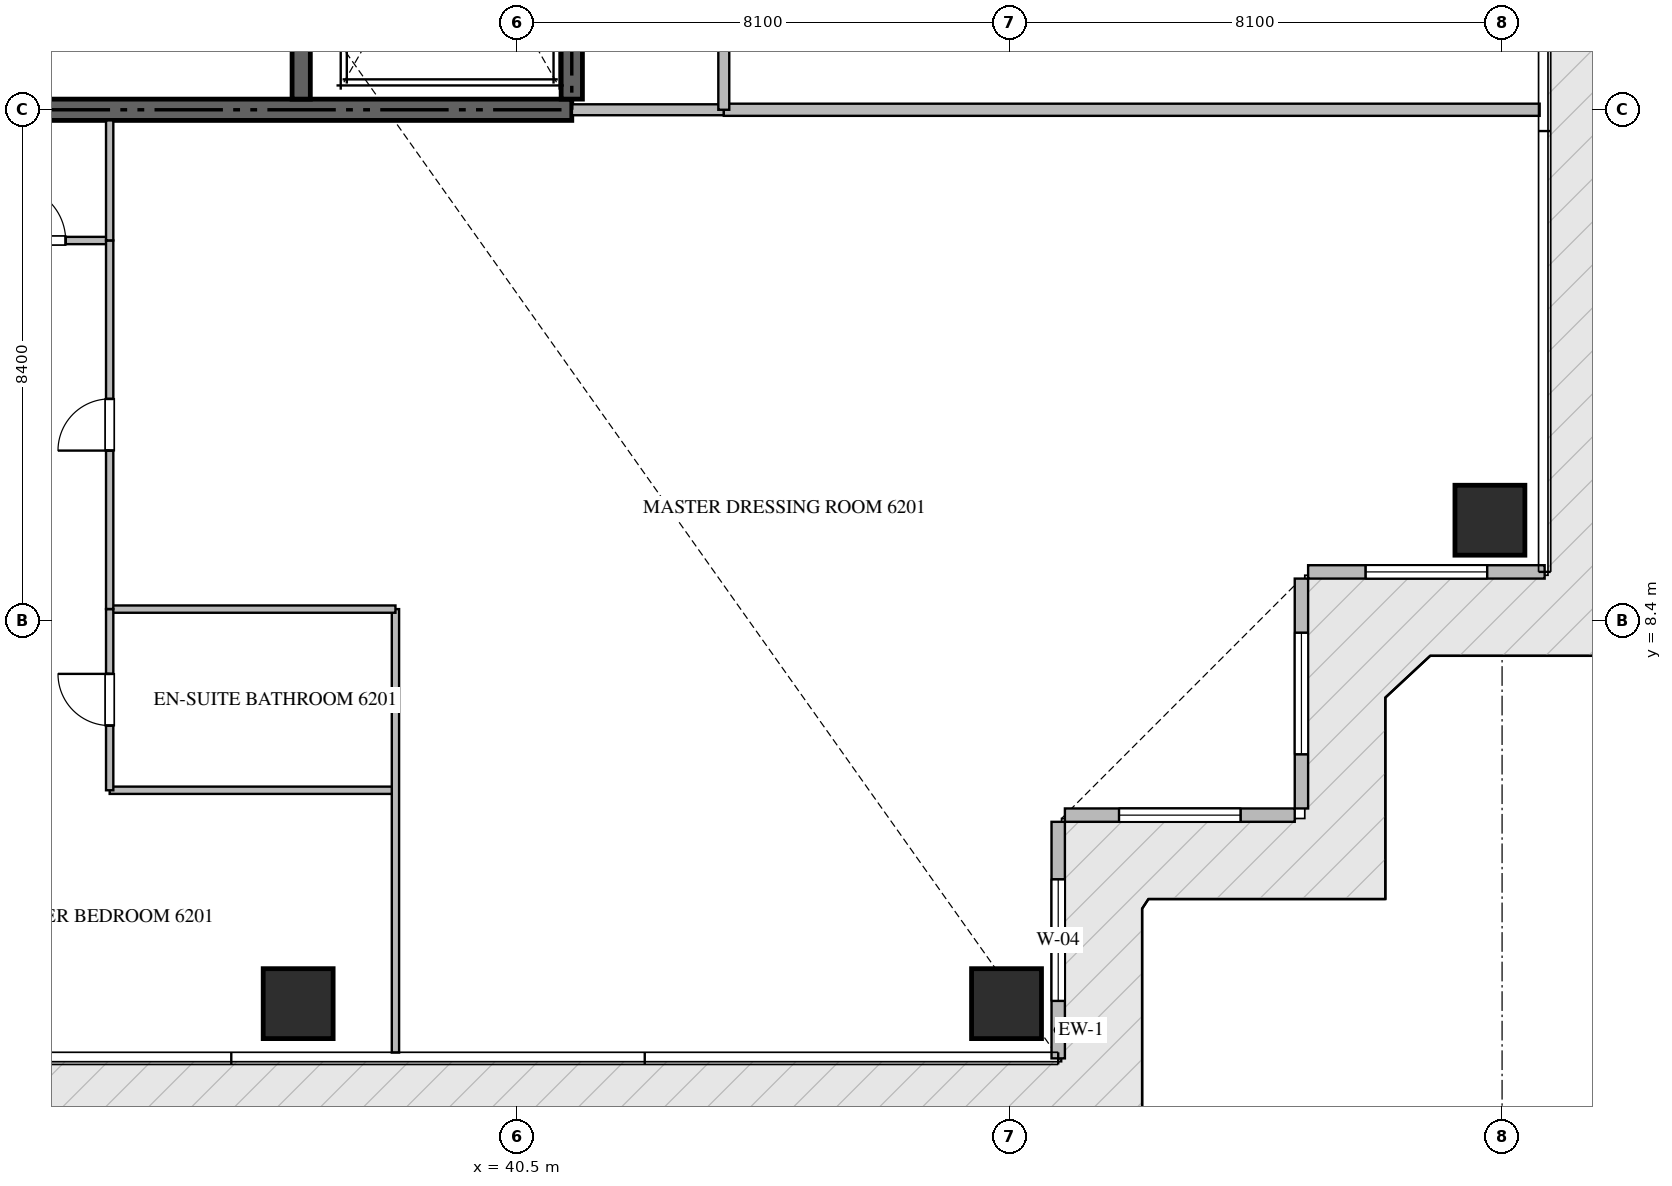
"""IFC4 building model, lengths in metres.
Left out: names, types, materials, properties, quantities, classifications, styles, units other than length and angle.
Written with IfcOpenShell. Run it as: python <this file> out.ifc"""

import sys

from ifc_helpers import new_model, si_unit, direction, frame, frame_2d, origin, origin_2d, place, context, subcontext, project, spatial, rectangle, extrude, source, transform, mapped, element, fill, save


model = new_model("IFC4")
c1 = context("Model", 3, precision=1e-05, world=origin(), true_north=direction((0.0, 1.0)))
c2 = subcontext(c1, "Body", "Model", "MODEL_VIEW")
j1 = project(units=[si_unit("LENGTHUNIT", "METRE"), si_unit("PLANEANGLEUNIT", "RADIAN")], contexts=[c1])
p1 = place(None, origin())
s1 = spatial("IfcSite", under=j1, at=p1, CompositionType="ELEMENT")
p2 = place(p1, origin())
s2 = spatial("IfcBuilding", under=s1, at=p2, CompositionType="ELEMENT")
p3 = place(p2, frame((0.0, 0.0, 248.95)))
s3 = spatial("IfcBuildingStorey", under=s2, at=p3, CompositionType="ELEMENT", Elevation=248.95)
p4 = place(p3, frame((23.4, 16.8, -0.26), z_axis=(0.0, 0.0, 1.0), x_axis=(1.0, 0.0, 0.0)))
e1 = element("IfcWall", 1, at=p4, inside=s3, PredefinedType="SHEAR", context=c2, shape_type="SweptSolid", body=[
    extrude(rectangle(XDim=18.0, YDim=0.35, at=frame_2d((9.0, 0.0))), origin(), (0.0, 0.0, 1.0), 3.848),
])
p5 = place(p3, frame((41.4, 16.975, -0.26), z_axis=(0.0, 0.0, 1.0), x_axis=(0.0, 1.0, 0.0)))
e2 = element("IfcWall", 2, at=p5, inside=s3, PredefinedType="SHEAR", context=c2, shape_type="SweptSolid", body=[
    extrude(rectangle(XDim=8.375, YDim=0.35, at=frame_2d((4.188, 0.0))), origin(), (0.0, 0.0, 1.0), 3.848),
])
p6 = place(p3, frame((36.95, 16.975, -0.26), z_axis=(0.0, 0.0, 1.0), x_axis=(0.0, 1.0, 0.0)))
e3 = element("IfcWall", 3, at=p6, inside=s3, PredefinedType="SHEAR", context=c2, shape_type="SweptSolid", body=[
    extrude(rectangle(XDim=8.375, YDim=0.3, at=frame_2d((4.188, 0.0))), origin(), (0.0, 0.0, 1.0), 3.848),
])
m1 = source(origin(), c2, "Body", "SweptSolid", [
    extrude(rectangle(XDim=1.15, YDim=1.15, at=origin_2d()), origin(), (0.0, 0.0, 1.0), 3.85),
])
for number, where, z_axis, x_axis in (
    (4, (36.9, 2.1, -0.26), (0.0, 0.0, 1.0), (1.0, 0.0, 0.0)),
    (5, (48.55, 2.1, -0.26), (0.0, 0.0, 1.0), (1.0, 0.0, 0.0)),
    (6, (56.5, 10.05, -0.26), (0.0, 0.0, 1.0), (1.0, 0.0, 0.0)),
):
    element("IfcColumn", number, at=place(p3, frame(where, z_axis=z_axis, x_axis=x_axis)), inside=s3, PredefinedType="COLUMN", context=c2, shape_type="MappedRepresentation", body=[
        mapped(m1, transform((0.0, 0.0, 0.0), scale=1.0)),
    ])
p7 = place(p3, frame((49.4, 1.2, 0.0), z_axis=(0.0, 0.0, 1.0), x_axis=(0.0, 1.0, 0.0)))
e7 = element("IfcWall", 7, at=p7, inside=s3, PredefinedType="ELEMENTEDWALL", context=c2, shape_type="SweptSolid", body=[
    extrude(rectangle(XDim=3.89, YDim=0.22, at=frame_2d((1.945, 0.0))), origin(), (0.0, 0.0, 1.0), 3.575),
])
p8 = place(p7, frame((0.945, 0.0, 0.65)))
e8 = element("IfcOpeningElement", 8, at=p8, cuts=e7, PredefinedType="OPENING", context=c2, shape_type="SweptSolid", body=[
    extrude(rectangle(XDim=2.0, YDim=2.2, at=frame_2d((1.0, 1.1))), frame((0.0, 0.12, 0.0), z_axis=(0.0, -1.0, 0.0), x_axis=(1.0, 0.0, 0.0)), (0.0, 0.0, 1.0), 0.24),
])
p9 = place(p3, frame((49.51, 5.2, 0.0), z_axis=(0.0, 0.0, 1.0), x_axis=(1.0, 0.0, 0.0)))
e9 = element("IfcWall", 9, at=p9, inside=s3, PredefinedType="ELEMENTEDWALL", context=c2, shape_type="SweptSolid", body=[
    extrude(rectangle(XDim=3.78, YDim=0.22, at=frame_2d((1.89, 0.0))), origin(), (0.0, 0.0, 1.0), 3.575),
])
p10 = place(p9, frame((0.89, 0.0, 0.65)))
e10 = element("IfcOpeningElement", 10, at=p10, cuts=e9, PredefinedType="OPENING", context=c2, shape_type="SweptSolid", body=[
    extrude(rectangle(XDim=2.0, YDim=2.2, at=frame_2d((1.0, 1.1))), frame((0.0, 0.12, 0.0), z_axis=(0.0, -1.0, 0.0), x_axis=(1.0, 0.0, 0.0)), (0.0, 0.0, 1.0), 0.24),
])
p11 = place(p3, frame((53.4, 5.31, 0.0), z_axis=(0.0, 0.0, 1.0), x_axis=(0.0, 1.0, 0.0)))
e11 = element("IfcWall", 11, at=p11, inside=s3, PredefinedType="ELEMENTEDWALL", context=c2, shape_type="SweptSolid", body=[
    extrude(rectangle(XDim=3.78, YDim=0.22, at=frame_2d((1.89, 0.0))), origin(), (0.0, 0.0, 1.0), 3.575),
])
p12 = place(p11, frame((0.89, 0.0, 0.65)))
e12 = element("IfcOpeningElement", 12, at=p12, cuts=e11, PredefinedType="OPENING", context=c2, shape_type="SweptSolid", body=[
    extrude(rectangle(XDim=2.0, YDim=2.2, at=frame_2d((1.0, 1.1))), frame((0.0, 0.12, 0.0), z_axis=(0.0, -1.0, 0.0), x_axis=(1.0, 0.0, 0.0)), (0.0, 0.0, 1.0), 0.24),
])
p13 = place(p3, frame((53.51, 9.2, 0.0), z_axis=(0.0, 0.0, 1.0), x_axis=(1.0, 0.0, 0.0)))
e13 = element("IfcWall", 13, at=p13, inside=s3, PredefinedType="ELEMENTEDWALL", context=c2, shape_type="SweptSolid", body=[
    extrude(rectangle(XDim=3.89, YDim=0.22, at=frame_2d((1.945, 0.0))), origin(), (0.0, 0.0, 1.0), 3.575),
])
p14 = place(p13, frame((0.945, 0.0, 0.65)))
e14 = element("IfcOpeningElement", 14, at=p14, cuts=e13, PredefinedType="OPENING", context=c2, shape_type="SweptSolid", body=[
    extrude(rectangle(XDim=2.0, YDim=2.2, at=frame_2d((1.0, 1.1))), frame((0.0, 0.12, 0.0), z_axis=(0.0, -1.0, 0.0), x_axis=(1.0, 0.0, 0.0)), (0.0, 0.0, 1.0), 0.24),
])
p15 = place(p3, frame((43.9, 16.8, 0.0), z_axis=(0.0, 0.0, 1.0), x_axis=(1.0, 0.0, 0.0)))
e15 = element("IfcWall", 15, at=p15, inside=s3, PredefinedType="PARTITIONING", context=c2, shape_type="SweptSolid", body=[
    extrude(rectangle(XDim=13.418, YDim=0.2, at=frame_2d((6.709, 0.0))), origin(), (0.0, 0.0, 1.0), 3.59),
])
p16 = place(p3, frame((41.402, 16.8, 0.0), z_axis=(0.0, 0.0, 1.0), x_axis=(1.0, 0.0, 0.0)))
e16 = element("IfcWall", 16, at=p16, inside=s3, PredefinedType="PARTITIONING", context=c2, shape_type="SweptSolid", body=[
    extrude(rectangle(XDim=2.496, YDim=0.18, at=frame_2d((1.248, 0.0))), origin(), (0.0, 0.0, 1.0), 3.59),
])
p17 = place(p3, frame((43.9, 16.8, 0.0), z_axis=(0.0, 0.0, 1.0), x_axis=(0.0, 1.0, 0.0)))
e17 = element("IfcWall", 17, at=p17, inside=s3, PredefinedType="PARTITIONING", context=c2, shape_type="SweptSolid", body=[
    extrude(rectangle(XDim=16.8, YDim=0.18, at=frame_2d((8.4, 0.0))), origin(), (0.0, 0.0, 1.0), 3.59),
])
p18 = place(p17, frame((1.3, 0.0, 0.0)))
e18 = element("IfcOpeningElement", 18, at=p18, cuts=e17, PredefinedType="OPENING", context=c2, shape_type="SweptSolid", body=[
    extrude(rectangle(XDim=1.0, YDim=2.15, at=frame_2d((0.5, 1.075))), frame((0.0, 0.1, 0.0), z_axis=(0.0, -1.0, 0.0), x_axis=(1.0, 0.0, 0.0)), (0.0, 0.0, 1.0), 0.2),
])
p19 = place(p3, frame((31.452, 14.65, 0.0), z_axis=(0.0, 0.0, 1.0), x_axis=(1.0, 0.0, 0.0)))
e19 = element("IfcWall", 19, at=p19, inside=s3, PredefinedType="PARTITIONING", context=c2, shape_type="SweptSolid", body=[
    extrude(rectangle(XDim=2.348, YDim=0.12, at=frame_2d((1.174, 0.0))), origin(), (0.0, 0.0, 1.0), 3.59),
])
p20 = place(p19, frame((0.724, 0.0, 0.0)))
e20 = element("IfcOpeningElement", 20, at=p20, cuts=e19, PredefinedType="OPENING", context=c2, shape_type="SweptSolid", body=[
    extrude(rectangle(XDim=0.9, YDim=2.1, at=frame_2d((0.45, 1.05))), frame((0.0, 0.07, 0.0), z_axis=(0.0, -1.0, 0.0), x_axis=(1.0, 0.0, 0.0)), (0.0, 0.0, 1.0), 0.14),
])
p21 = place(p3, frame((33.8, 5.609, 0.0), z_axis=(0.0, 0.0, 1.0), x_axis=(1.0, 0.0, 0.0)))
e21 = element("IfcWall", 21, at=p21, inside=s3, PredefinedType="PARTITIONING", context=c2, shape_type="SweptSolid", body=[
    extrude(rectangle(XDim=4.7, YDim=0.12, at=frame_2d((2.35, 0.0))), origin(), (0.0, 0.0, 1.0), 3.59),
])
p22 = place(p3, frame((38.5, 1.295, 0.0), z_axis=(0.0, 0.0, 1.0), x_axis=(0.0, 1.0, 0.0)))
e22 = element("IfcWall", 22, at=p22, inside=s3, PredefinedType="PARTITIONING", context=c2, shape_type="SweptSolid", body=[
    extrude(rectangle(XDim=7.293, YDim=0.12, at=frame_2d((3.646, 0.0))), origin(), (0.0, 0.0, 1.0), 3.59),
])
p23 = place(p3, frame((33.8, 8.588, 0.0), z_axis=(0.0, 0.0, 1.0), x_axis=(1.0, 0.0, 0.0)))
e23 = element("IfcWall", 23, at=p23, inside=s3, PredefinedType="PARTITIONING", context=c2, shape_type="SweptSolid", body=[
    extrude(rectangle(XDim=4.7, YDim=0.12, at=frame_2d((2.35, 0.0))), origin(), (0.0, 0.0, 1.0), 3.59),
])
p24 = place(p3, frame((33.8, 5.609, 0.0), z_axis=(0.0, 0.0, 1.0), x_axis=(0.0, 1.0, 0.0)))
e24 = element("IfcWall", 24, at=p24, inside=s3, PredefinedType="PARTITIONING", context=c2, shape_type="SweptSolid", body=[
    extrude(rectangle(XDim=2.979, YDim=0.12, at=frame_2d((1.49, 0.0))), origin(), (0.0, 0.0, 1.0), 3.59),
])
p25 = place(p24, frame((1.064, 0.0, 0.0)))
e25 = element("IfcOpeningElement", 25, at=p25, cuts=e24, PredefinedType="OPENING", context=c2, shape_type="SweptSolid", body=[
    extrude(rectangle(XDim=0.85, YDim=2.1, at=frame_2d((0.425, 1.05))), frame((0.0, 0.07, 0.0), z_axis=(0.0, -1.0, 0.0), x_axis=(1.0, 0.0, 0.0)), (0.0, 0.0, 1.0), 0.14),
])
p26 = place(p3, frame((33.8, 8.59, 0.0), z_axis=(0.0, 0.0, 1.0), x_axis=(0.0, 1.0, 0.0)))
e26 = element("IfcWall", 26, at=p26, inside=s3, PredefinedType="PARTITIONING", context=c2, shape_type="SweptSolid", body=[
    extrude(rectangle(XDim=6.06, YDim=0.12, at=frame_2d((3.03, 0.0))), origin(), (0.0, 0.0, 1.0), 3.59),
])
p27 = place(p26, frame((2.605, 0.0, 0.0)))
e27 = element("IfcOpeningElement", 27, at=p27, cuts=e26, PredefinedType="OPENING", context=c2, shape_type="SweptSolid", body=[
    extrude(rectangle(XDim=0.85, YDim=2.1, at=frame_2d((0.425, 1.05))), frame((0.0, 0.07, 0.0), z_axis=(0.0, -1.0, 0.0), x_axis=(1.0, 0.0, 0.0)), (0.0, 0.0, 1.0), 0.14),
])
p28 = place(p3, frame((33.8, 14.652, 0.0), z_axis=(0.0, 0.0, 1.0), x_axis=(0.0, 1.0, 0.0)))
e28 = element("IfcWall", 28, at=p28, inside=s3, PredefinedType="PARTITIONING", context=c2, shape_type="SweptSolid", body=[
    extrude(rectangle(XDim=1.973, YDim=0.12, at=frame_2d((0.986, 0.0))), origin(), (0.0, 0.0, 1.0), 3.59),
])
m2 = source(origin(), c2, "Body", "SweptSolid", [
    extrude(rectangle(XDim=2.0, YDim=2.2, at=frame_2d((1.0, 1.1))), frame((0.0, 0.03, 0.0), z_axis=(0.0, -1.0, 0.0), x_axis=(1.0, 0.0, 0.0)), (0.0, 0.0, 1.0), 0.06),
])
p29 = place(p8, origin())
e29 = element("IfcWindow", 29, at=p29, inside=s3, PartitioningType="SINGLE_PANEL", PredefinedType="WINDOW", context=c2, shape_type="MappedRepresentation", body=[
    mapped(m2, transform((0.0, 0.0, 0.0), scale=1.0)),
])
fill(e8, e29)
p30 = place(p10, origin())
e30 = element("IfcWindow", 30, at=p30, inside=s3, PartitioningType="SINGLE_PANEL", PredefinedType="WINDOW", context=c2, shape_type="MappedRepresentation", body=[
    mapped(m2, transform((0.0, 0.0, 0.0), scale=1.0)),
])
fill(e10, e30)
p31 = place(p12, origin())
e31 = element("IfcWindow", 31, at=p31, inside=s3, PartitioningType="SINGLE_PANEL", PredefinedType="WINDOW", context=c2, shape_type="MappedRepresentation", body=[
    mapped(m2, transform((0.0, 0.0, 0.0), scale=1.0)),
])
fill(e12, e31)
p32 = place(p14, origin())
e32 = element("IfcWindow", 32, at=p32, inside=s3, PartitioningType="SINGLE_PANEL", PredefinedType="WINDOW", context=c2, shape_type="MappedRepresentation", body=[
    mapped(m2, transform((0.0, 0.0, 0.0), scale=1.0)),
])
fill(e14, e32)
m3 = source(origin(), c2, "Body", "SweptSolid", [
    extrude(rectangle(XDim=0.9, YDim=2.1, at=frame_2d((0.45, 1.05))), frame((0.0, 0.025, 0.0), z_axis=(0.0, -1.0, 0.0), x_axis=(1.0, 0.0, 0.0)), (0.0, 0.0, 1.0), 0.05),
])
p33 = place(p20, origin())
e33 = element("IfcDoor", 33, at=p33, inside=s3, OperationType="SINGLE_SWING_LEFT", PredefinedType="DOOR", context=c2, shape_type="MappedRepresentation", body=[
    mapped(m3, transform((0.0, 0.0, 0.0), scale=1.0)),
])
fill(e20, e33)
m4 = source(origin(), c2, "Body", "SweptSolid", [
    extrude(rectangle(XDim=0.85, YDim=2.1, at=frame_2d((0.425, 1.05))), frame((0.0, 0.025, 0.0), z_axis=(0.0, -1.0, 0.0), x_axis=(1.0, 0.0, 0.0)), (0.0, 0.0, 1.0), 0.05),
])
p34 = place(p25, origin())
e34 = element("IfcDoor", 34, at=p34, inside=s3, OperationType="SINGLE_SWING_RIGHT", PredefinedType="DOOR", context=c2, shape_type="MappedRepresentation", body=[
    mapped(m4, transform((0.0, 0.0, 0.0), scale=1.0)),
])
fill(e25, e34)
p35 = place(p27, origin())
e35 = element("IfcDoor", 35, at=p35, inside=s3, OperationType="SINGLE_SWING_LEFT", PredefinedType="DOOR", context=c2, shape_type="MappedRepresentation", body=[
    mapped(m4, transform((0.0, 0.0, 0.0), scale=1.0)),
])
fill(e27, e35)
save(model, sys.argv[1])
